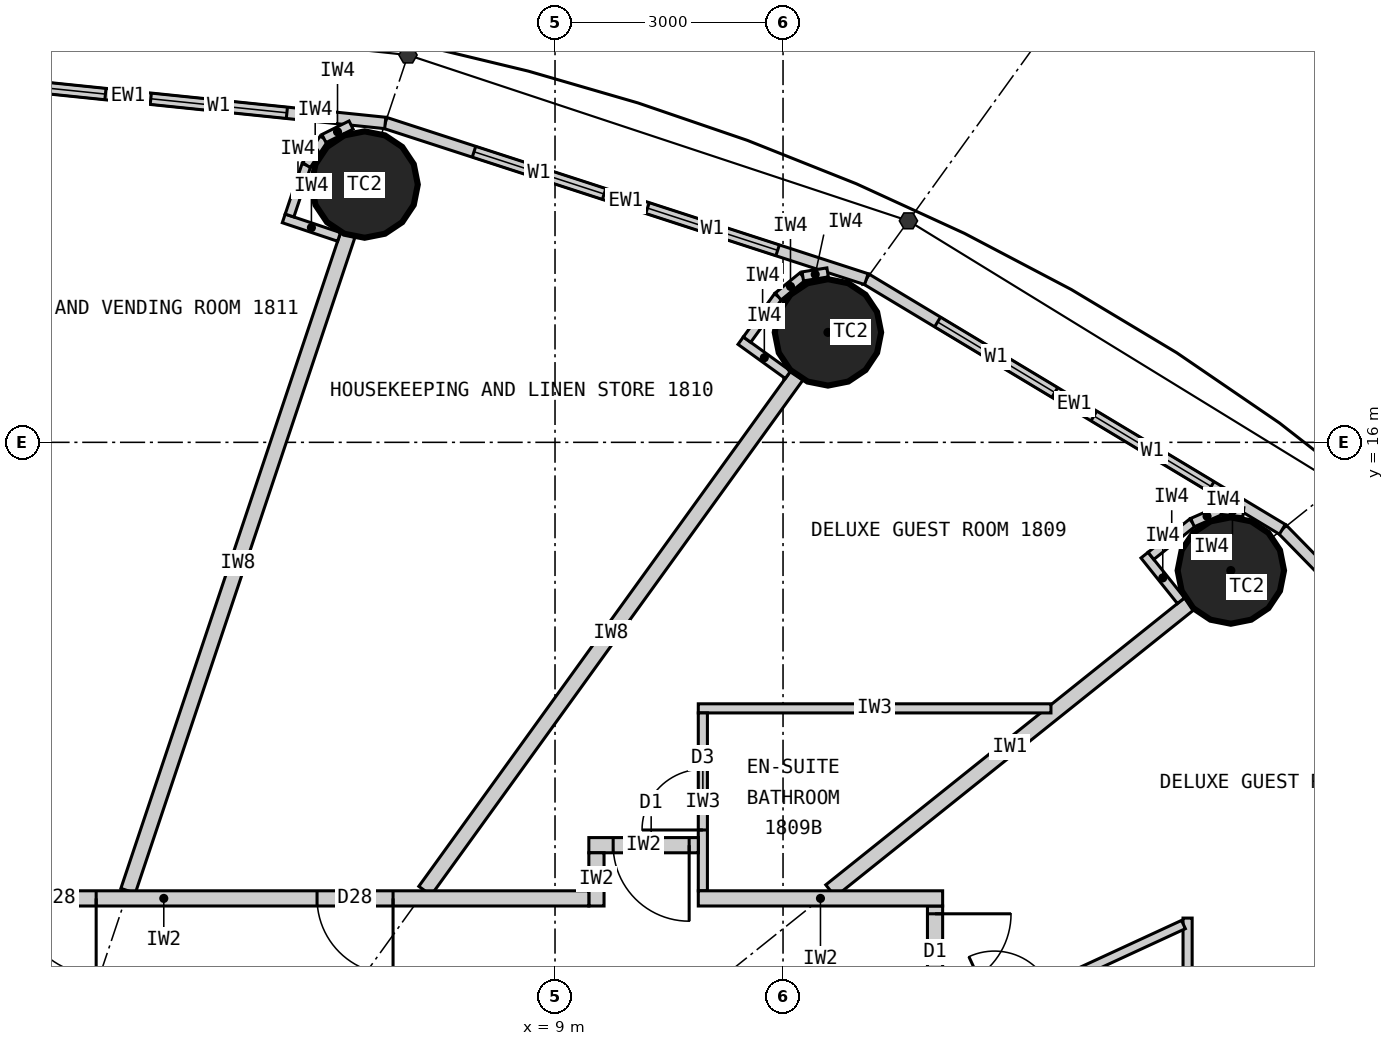
"""IFC4 building model, lengths in metres.
Left out: names, types, materials, properties, quantities, classifications, styles, units other than length and angle.
Written with IfcOpenShell. Run it as: python <this file> out.ifc"""

import sys

from ifc_helpers import new_model, si_unit, direction, frame, frame_2d, origin, origin_2d, place, context, subcontext, project, spatial, rectangle, circle, extrude, element, fill, save


model = new_model("IFC4")
c1 = context("Model", 3, precision=1e-05, world=origin(), true_north=direction((0.0, 1.0)))
c2 = subcontext(c1, "Body", "Model", "MODEL_VIEW")
j1 = project(units=[si_unit("LENGTHUNIT", "METRE"), si_unit("PLANEANGLEUNIT", "RADIAN")], contexts=[c1])
p1 = place(None, origin())
s1 = spatial("IfcSite", under=j1, at=p1, CompositionType="ELEMENT")
p2 = place(p1, origin())
s2 = spatial("IfcBuilding", under=s1, at=p2, CompositionType="ELEMENT")
p3 = place(p2, frame((0.0, 0.0, 73.8)))
s3 = spatial("IfcBuildingStorey", under=s2, at=p3, CompositionType="ELEMENT", Elevation=73.8)
for number, where, z_axis, x_axis in (
    (1, (17.892, 14.313, 0.0), (0.0, 0.0, 1.0), (1.0, 0.0, 0.0)),
    (2, (12.591, 17.447, 0.0), (0.0, 0.0, 1.0), (1.0, 0.0, 0.0)),
    (3, (6.495, 19.391, 0.0), (0.0, 0.0, 1.0), (1.0, 0.0, 0.0)),
):
    element("IfcColumn", number, at=place(p3, frame(where, z_axis=z_axis, x_axis=x_axis)), inside=s3, PredefinedType="COLUMN", context=c2, shape_type="SweptSolid", body=[
        extrude(circle(Radius=0.7, at=origin_2d()), origin(), (0.0, 0.0, 1.0), 3.3),
    ])
p4 = place(p3, frame((22.803, 10.532, 0.0), z_axis=(0.0, 0.0, 1.0), x_axis=(-0.699602905915, 0.714531856557, 0.0)))
e4 = element("IfcWall", 4, at=p4, inside=s3, PredefinedType="ELEMENTEDWALL", context=c2, shape_type="SweptSolid", body=[
    extrude(rectangle(XDim=6.051, YDim=0.15, at=frame_2d((3.025, 0.0))), origin(), (0.0, 0.0, 1.0), 3.12),
])
p5 = place(p4, frame((0.926, 0.0, 0.9)))
e5 = element("IfcOpeningElement", 5, at=p5, cuts=e4, PredefinedType="OPENING", context=c2, shape_type="SweptSolid", body=[
    extrude(rectangle(XDim=1.8, YDim=1.9, at=frame_2d((0.9, 0.95))), frame((0.0, 0.085, 0.0), z_axis=(0.0, -1.0, 0.0), x_axis=(1.0, 0.0, 0.0)), (0.0, 0.0, 1.0), 0.17),
])
p6 = place(p4, frame((3.325, 0.0, 0.9)))
e6 = element("IfcOpeningElement", 6, at=p6, cuts=e4, PredefinedType="OPENING", context=c2, shape_type="SweptSolid", body=[
    extrude(rectangle(XDim=1.8, YDim=1.9, at=frame_2d((0.9, 0.95))), frame((0.0, 0.085, 0.0), z_axis=(0.0, -1.0, 0.0), x_axis=(1.0, 0.0, 0.0)), (0.0, 0.0, 1.0), 0.17),
])
p7 = place(p3, frame((18.57, 14.856, 0.0), z_axis=(0.0, 0.0, 1.0), x_axis=(-0.856983180864, 0.515344377787, 0.0)))
e7 = element("IfcWall", 7, at=p7, inside=s3, PredefinedType="ELEMENTEDWALL", context=c2, shape_type="SweptSolid", body=[
    extrude(rectangle(XDim=6.386, YDim=0.15, at=frame_2d((3.193, 0.0))), origin(), (0.0, 0.0, 1.0), 3.12),
])
p8 = place(p7, frame((1.093, 0.0, 0.9)))
e8 = element("IfcOpeningElement", 8, at=p8, cuts=e7, PredefinedType="OPENING", context=c2, shape_type="SweptSolid", body=[
    extrude(rectangle(XDim=1.8, YDim=1.9, at=frame_2d((0.9, 0.95))), frame((0.0, 0.085, 0.0), z_axis=(0.0, -1.0, 0.0), x_axis=(1.0, 0.0, 0.0)), (0.0, 0.0, 1.0), 0.17),
])
p9 = place(p7, frame((3.493, 0.0, 0.9)))
e9 = element("IfcOpeningElement", 9, at=p9, cuts=e7, PredefinedType="OPENING", context=c2, shape_type="SweptSolid", body=[
    extrude(rectangle(XDim=1.8, YDim=1.9, at=frame_2d((0.9, 0.95))), frame((0.0, 0.085, 0.0), z_axis=(0.0, -1.0, 0.0), x_axis=(1.0, 0.0, 0.0)), (0.0, 0.0, 1.0), 0.17),
])
p10 = place(p3, frame((13.096, 18.147, 0.0), z_axis=(0.0, 0.0, 1.0), x_axis=(-0.951137534625, 0.308767534285, 0.0)))
e10 = element("IfcWall", 10, at=p10, inside=s3, PredefinedType="ELEMENTEDWALL", context=c2, shape_type="SweptSolid", body=[
    extrude(rectangle(XDim=6.655, YDim=0.15, at=frame_2d((3.328, 0.0))), origin(), (0.0, 0.0, 1.0), 3.12),
])
p11 = place(p10, frame((1.228, 0.0, 0.9)))
e11 = element("IfcOpeningElement", 11, at=p11, cuts=e10, PredefinedType="OPENING", context=c2, shape_type="SweptSolid", body=[
    extrude(rectangle(XDim=1.8, YDim=1.9, at=frame_2d((0.9, 0.95))), frame((0.0, 0.085, 0.0), z_axis=(0.0, -1.0, 0.0), x_axis=(1.0, 0.0, 0.0)), (0.0, 0.0, 1.0), 0.17),
])
p12 = place(p10, frame((3.628, 0.0, 0.9)))
e12 = element("IfcOpeningElement", 12, at=p12, cuts=e10, PredefinedType="OPENING", context=c2, shape_type="SweptSolid", body=[
    extrude(rectangle(XDim=1.8, YDim=1.9, at=frame_2d((0.9, 0.95))), frame((0.0, 0.085, 0.0), z_axis=(0.0, -1.0, 0.0), x_axis=(1.0, 0.0, 0.0)), (0.0, 0.0, 1.0), 0.17),
])
p13 = place(p3, frame((6.766, 20.202, 0.0), z_axis=(0.0, 0.0, 1.0), x_axis=(-0.994721394369, 0.102612609291, 0.0)))
e13 = element("IfcWall", 13, at=p13, inside=s3, PredefinedType="ELEMENTEDWALL", context=c2, shape_type="SweptSolid", body=[
    extrude(rectangle(XDim=6.802, YDim=0.15, at=frame_2d((3.401, 0.0))), origin(), (0.0, 0.0, 1.0), 3.12),
])
p14 = place(p13, frame((1.301, 0.0, 0.9)))
e14 = element("IfcOpeningElement", 14, at=p14, cuts=e13, PredefinedType="OPENING", context=c2, shape_type="SweptSolid", body=[
    extrude(rectangle(XDim=1.8, YDim=1.9, at=frame_2d((0.9, 0.95))), frame((0.0, 0.085, 0.0), z_axis=(0.0, -1.0, 0.0), x_axis=(1.0, 0.0, 0.0)), (0.0, 0.0, 1.0), 0.17),
])
p15 = place(p13, frame((3.701, 0.0, 0.9)))
e15 = element("IfcOpeningElement", 15, at=p15, cuts=e13, PredefinedType="OPENING", context=c2, shape_type="SweptSolid", body=[
    extrude(rectangle(XDim=1.8, YDim=1.9, at=frame_2d((0.9, 0.95))), frame((0.0, 0.085, 0.0), z_axis=(0.0, -1.0, 0.0), x_axis=(1.0, 0.0, 0.0)), (0.0, 0.0, 1.0), 0.17),
])
p16 = place(p3, frame((14.1, 6.512, 0.0), z_axis=(0.0, 0.0, 1.0), x_axis=(0.907832871056, 0.419332181247, 0.0)))
e16 = element("IfcWall", 16, at=p16, inside=s3, PredefinedType="PARTITIONING", context=c2, shape_type="SweptSolid", body=[
    extrude(rectangle(XDim=8.023, YDim=0.2, at=frame_2d((4.011, 0.0))), origin(), (0.0, 0.0, 1.0), 2.32),
])
p17 = place(p3, frame((12.625, 10.1, 0.0), z_axis=(0.0, 0.0, 1.0), x_axis=(0.780892451574, 0.624665493744, 0.0)))
e17 = element("IfcWall", 17, at=p17, inside=s3, PredefinedType="PARTITIONING", context=c2, shape_type="SweptSolid", body=[
    extrude(rectangle(XDim=6.045, YDim=0.2, at=frame_2d((3.022, 0.0))), origin(), (0.0, 0.0, 1.0), 2.32),
])
p18 = place(p3, frame((7.289, 10.1, 0.0), z_axis=(0.0, 0.0, 1.0), x_axis=(0.585198353053, 0.810890182197, 0.0)))
e18 = element("IfcWall", 18, at=p18, inside=s3, PredefinedType="PARTITIONING", context=c2, shape_type="SweptSolid", body=[
    extrude(rectangle(XDim=8.36, YDim=0.2, at=frame_2d((4.18, 0.0))), origin(), (0.0, 0.0, 1.0), 2.32),
])
p19 = place(p3, frame((3.383, 10.1, 0.0), z_axis=(0.0, 0.0, 1.0), x_axis=(0.31759592231, 0.948226149256, 0.0)))
e19 = element("IfcWall", 19, at=p19, inside=s3, PredefinedType="PARTITIONING", context=c2, shape_type="SweptSolid", body=[
    extrude(rectangle(XDim=9.098, YDim=0.2, at=frame_2d((4.549, 0.0))), origin(), (0.0, 0.0, 1.0), 2.32),
])
p20 = place(p3, frame((17.323, 8.101, 0.0), z_axis=(0.0, 0.0, 1.0), x_axis=(0.0, 1.0, 0.0)))
e20 = element("IfcWall", 20, at=p20, inside=s3, PredefinedType="PARTITIONING", context=c2, shape_type="SweptSolid", body=[
    extrude(rectangle(XDim=1.64, YDim=0.12, at=frame_2d((0.82, 0.0))), origin(), (0.0, 0.0, 1.0), 3.12),
])
p21 = place(p3, frame((14.1, 8.193, 0.0), z_axis=(0.0, 0.0, 1.0), x_axis=(0.907836493557, 0.419324338628, 0.0)))
e21 = element("IfcWall", 21, at=p21, inside=s3, PredefinedType="PARTITIONING", context=c2, shape_type="SweptSolid", body=[
    extrude(rectangle(XDim=3.49, YDim=0.12, at=frame_2d((1.745, 0.0))), origin(), (0.0, 0.0, 1.0), 3.12),
])
p22 = place(p21, frame((0.75, 0.0, 0.0)))
e22 = element("IfcOpeningElement", 22, at=p22, cuts=e21, PredefinedType="OPENING", context=c2, shape_type="SweptSolid", body=[
    extrude(rectangle(XDim=0.8, YDim=2.1, at=frame_2d((0.4, 1.05))), frame((0.0, 0.07, 0.0), z_axis=(0.0, -1.0, 0.0), x_axis=(1.0, 0.0, 0.0)), (0.0, 0.0, 1.0), 0.14),
])
p23 = place(p3, frame((15.525, 12.5, 0.0), z_axis=(0.0, 0.0, 1.0), x_axis=(-1.0, 0.0, 0.0)))
e23 = element("IfcWall", 23, at=p23, inside=s3, PredefinedType="PARTITIONING", context=c2, shape_type="SweptSolid", body=[
    extrude(rectangle(XDim=4.64, YDim=0.12, at=frame_2d((2.32, 0.0))), origin(), (0.0, 0.0, 1.0), 3.12),
])
p24 = place(p3, frame((10.945, 10.1, 0.0), z_axis=(0.0, 0.0, 1.0), x_axis=(0.0, 1.0, 0.0)))
e24 = element("IfcWall", 24, at=p24, inside=s3, PredefinedType="PARTITIONING", context=c2, shape_type="SweptSolid", body=[
    extrude(rectangle(XDim=2.34, YDim=0.12, at=frame_2d((1.17, 0.0))), origin(), (0.0, 0.0, 1.0), 3.12),
])
p25 = place(p24, frame((0.8, 0.0, 0.0)))
e25 = element("IfcOpeningElement", 25, at=p25, cuts=e24, PredefinedType="OPENING", context=c2, shape_type="SweptSolid", body=[
    extrude(rectangle(XDim=0.8, YDim=2.1, at=frame_2d((0.4, 1.05))), frame((0.0, 0.07, 0.0), z_axis=(0.0, -1.0, 0.0), x_axis=(1.0, 0.0, 0.0)), (0.0, 0.0, 1.0), 0.14),
])
p26 = place(p3, frame((9.445, 10.7, 0.0), z_axis=(0.0, 0.0, 1.0), x_axis=(1.0, 0.0, 0.0)))
e26 = element("IfcWall", 26, at=p26, inside=s3, PredefinedType="PARTITIONING", context=c2, shape_type="SweptSolid", body=[
    extrude(rectangle(XDim=1.44, YDim=0.2, at=frame_2d((0.72, 0.0))), origin(), (0.0, 0.0, 1.0), 3.12),
])
p27 = place(p26, frame((0.32, 0.0, 0.0)))
e27 = element("IfcOpeningElement", 27, at=p27, cuts=e26, PredefinedType="OPENING", context=c2, shape_type="SweptSolid", body=[
    extrude(rectangle(XDim=1.0, YDim=2.2, at=frame_2d((0.5, 1.1))), frame((0.0, 0.11, 0.0), z_axis=(0.0, -1.0, 0.0), x_axis=(1.0, 0.0, 0.0)), (0.0, 0.0, 1.0), 0.22),
])
p28 = place(p3, frame((9.545, 9.9, 0.0), z_axis=(0.0, 0.0, 1.0), x_axis=(0.0, 1.0, 0.0)))
e28 = element("IfcWall", 28, at=p28, inside=s3, PredefinedType="PARTITIONING", context=c2, shape_type="SweptSolid", body=[
    extrude(rectangle(XDim=0.7, YDim=0.2, at=frame_2d((0.35, 0.0))), origin(), (0.0, 0.0, 1.0), 3.12),
])
p29 = place(p3, frame((14.0, 4.772, 0.0), z_axis=(0.0, 0.0, 1.0), x_axis=(0.0, 1.0, 0.0)))
e29 = element("IfcWall", 29, at=p29, inside=s3, PredefinedType="PARTITIONING", context=c2, shape_type="SweptSolid", body=[
    extrude(rectangle(XDim=5.127, YDim=0.2, at=frame_2d((2.564, 0.0))), origin(), (0.0, 0.0, 1.0), 3.12),
])
p30 = place(p29, frame((4.025, 0.0, 0.0)))
e30 = element("IfcOpeningElement", 30, at=p30, cuts=e29, PredefinedType="OPENING", context=c2, shape_type="SweptSolid", body=[
    extrude(rectangle(XDim=1.0, YDim=2.2, at=frame_2d((0.5, 1.1))), frame((0.0, 0.11, 0.0), z_axis=(0.0, -1.0, 0.0), x_axis=(1.0, 0.0, 0.0)), (0.0, 0.0, 1.0), 0.22),
])
p31 = place(p3, frame((-1.74, 10.0, 0.0), z_axis=(0.0, 0.0, 1.0), x_axis=(1.0, 0.0, 0.0)))
e31 = element("IfcWall", 31, at=p31, inside=s3, PredefinedType="PARTITIONING", context=c2, shape_type="SweptSolid", body=[
    extrude(rectangle(XDim=11.185, YDim=0.2, at=frame_2d((5.593, 0.0))), origin(), (0.0, 0.0, 1.0), 3.12),
])
p32 = place(p31, frame((7.609, 0.0, 0.0)))
e32 = element("IfcOpeningElement", 32, at=p32, cuts=e31, PredefinedType="OPENING", context=c2, shape_type="SweptSolid", body=[
    extrude(rectangle(XDim=1.0, YDim=2.2, at=frame_2d((0.5, 1.1))), frame((0.0, 0.11, 0.0), z_axis=(0.0, -1.0, 0.0), x_axis=(1.0, 0.0, 0.0)), (0.0, 0.0, 1.0), 0.22),
])
p33 = place(p31, frame((3.703, 0.0, 0.0)))
e33 = element("IfcOpeningElement", 33, at=p33, cuts=e31, PredefinedType="OPENING", context=c2, shape_type="SweptSolid", body=[
    extrude(rectangle(XDim=1.0, YDim=2.2, at=frame_2d((0.5, 1.1))), frame((0.0, 0.11, 0.0), z_axis=(0.0, -1.0, 0.0), x_axis=(1.0, 0.0, 0.0)), (0.0, 0.0, 1.0), 0.22),
])
p34 = place(p3, frame((10.885, 10.0, 0.0), z_axis=(0.0, 0.0, 1.0), x_axis=(1.0, 0.0, 0.0)))
e34 = element("IfcWall", 34, at=p34, inside=s3, PredefinedType="PARTITIONING", context=c2, shape_type="SweptSolid", body=[
    extrude(rectangle(XDim=3.215, YDim=0.2, at=frame_2d((1.607, 0.0))), origin(), (0.0, 0.0, 1.0), 3.12),
])
p35 = place(p3, frame((17.236, 13.917, 0.0), z_axis=(0.0, 0.0, 1.0), x_axis=(-0.624695047554, 0.780868809443, 0.0)))
e35 = element("IfcWall", 35, at=p35, inside=s3, PredefinedType="PARTITIONING", context=c2, shape_type="SweptSolid", body=[
    extrude(rectangle(XDim=0.768, YDim=0.12, at=frame_2d((0.384, 0.0))), origin(), (0.0, 0.0, 1.0), 3.12),
])
p36 = place(p3, frame((16.841, 14.507, 0.0), z_axis=(0.0, 0.0, 1.0), x_axis=(0.780902834923, 0.62465251333, 0.0)))
e36 = element("IfcWall", 36, at=p36, inside=s3, PredefinedType="PARTITIONING", context=c2, shape_type="SweptSolid", body=[
    extrude(rectangle(XDim=0.7, YDim=0.12, at=frame_2d((0.35, 0.0))), origin(), (0.0, 0.0, 1.0), 3.12),
])
p37 = place(p3, frame((17.387, 14.944, 0.0), z_axis=(0.0, 0.0, 1.0), x_axis=(0.916036698064, 0.401094462441, 0.0)))
e37 = element("IfcWall", 37, at=p37, inside=s3, PredefinedType="PARTITIONING", context=c2, shape_type="SweptSolid", body=[
    extrude(rectangle(XDim=0.418, YDim=0.12, at=frame_2d((0.209, 0.0))), origin(), (0.0, 0.0, 1.0), 3.12),
])
p38 = place(p3, frame((17.77, 15.112, 0.0), z_axis=(0.0, 0.0, 1.0), x_axis=(0.993904401174, -0.110245368731, 0.0)))
e38 = element("IfcWall", 38, at=p38, inside=s3, PredefinedType="PARTITIONING", context=c2, shape_type="SweptSolid", body=[
    extrude(rectangle(XDim=0.288, YDim=0.12, at=frame_2d((0.144, 0.0))), origin(), (0.0, 0.0, 1.0), 3.12),
])
p39 = place(p3, frame((12.065, 16.889, 0.0), z_axis=(0.0, 0.0, 1.0), x_axis=(-0.810821798253, 0.585293098778, 0.0)))
e39 = element("IfcWall", 39, at=p39, inside=s3, PredefinedType="PARTITIONING", context=c2, shape_type="SweptSolid", body=[
    extrude(rectangle(XDim=0.768, YDim=0.12, at=frame_2d((0.384, 0.0))), origin(), (0.0, 0.0, 1.0), 3.12),
])
p40 = place(p3, frame((11.526, 17.351, 0.0), z_axis=(0.0, 0.0, 1.0), x_axis=(0.585223113993, 0.810872312296, 0.0)))
e40 = element("IfcWall", 40, at=p40, inside=s3, PredefinedType="PARTITIONING", context=c2, shape_type="SweptSolid", body=[
    extrude(rectangle(XDim=0.7, YDim=0.12, at=frame_2d((0.35, 0.0))), origin(), (0.0, 0.0, 1.0), 3.12),
])
p41 = place(p3, frame((11.936, 17.919, 0.0), z_axis=(0.0, 0.0, 1.0), x_axis=(0.775023088441, 0.631932917629, 0.0)))
e41 = element("IfcWall", 41, at=p41, inside=s3, PredefinedType="PARTITIONING", context=c2, shape_type="SweptSolid", body=[
    extrude(rectangle(XDim=0.418, YDim=0.12, at=frame_2d((0.209, 0.0))), origin(), (0.0, 0.0, 1.0), 3.12),
])
p42 = place(p3, frame((12.26, 18.183, 0.0), z_axis=(0.0, 0.0, 1.0), x_axis=(0.987218661664, 0.159371622511, 0.0)))
e42 = element("IfcWall", 42, at=p42, inside=s3, PredefinedType="PARTITIONING", context=c2, shape_type="SweptSolid", body=[
    extrude(rectangle(XDim=0.331, YDim=0.12, at=frame_2d((0.166, 0.0))), origin(), (0.0, 0.0, 1.0), 3.12),
])
p43 = place(p3, frame((6.159, 18.702, 0.0), z_axis=(0.0, 0.0, 1.0), x_axis=(-0.948173154049, 0.31775410295, 0.0)))
e43 = element("IfcWall", 43, at=p43, inside=s3, PredefinedType="PARTITIONING", context=c2, shape_type="SweptSolid", body=[
    extrude(rectangle(XDim=0.768, YDim=0.12, at=frame_2d((0.384, 0.0))), origin(), (0.0, 0.0, 1.0), 3.12),
])
p44 = place(p3, frame((5.507, 18.984, 0.0), z_axis=(0.0, 0.0, 1.0), x_axis=(0.317692050622, 0.948193946918, 0.0)))
e44 = element("IfcWall", 44, at=p44, inside=s3, PredefinedType="PARTITIONING", context=c2, shape_type="SweptSolid", body=[
    extrude(rectangle(XDim=0.7, YDim=0.12, at=frame_2d((0.35, 0.0))), origin(), (0.0, 0.0, 1.0), 3.12),
])
p45 = place(p3, frame((5.729, 19.648, 0.0), z_axis=(0.0, 0.0, 1.0), x_axis=(0.552135764955, 0.833754218615, 0.0)))
e45 = element("IfcWall", 45, at=p45, inside=s3, PredefinedType="PARTITIONING", context=c2, shape_type="SweptSolid", body=[
    extrude(rectangle(XDim=0.418, YDim=0.12, at=frame_2d((0.209, 0.0))), origin(), (0.0, 0.0, 1.0), 3.12),
])
p46 = place(p3, frame((5.96, 19.996, 0.0), z_axis=(0.0, 0.0, 1.0), x_axis=(0.895160725913, 0.445743507842, 0.0)))
e46 = element("IfcWall", 46, at=p46, inside=s3, PredefinedType="PARTITIONING", context=c2, shape_type="SweptSolid", body=[
    extrude(rectangle(XDim=0.399, YDim=0.12, at=frame_2d((0.199, 0.0))), origin(), (0.0, 0.0, 1.0), 3.12),
])
p47 = place(p8, origin())
e47 = element("IfcWindow", 47, at=p47, inside=s3, PartitioningType="SINGLE_PANEL", PredefinedType="WINDOW", context=c2, shape_type="SweptSolid", body=[
    extrude(rectangle(XDim=1.8, YDim=1.9, at=frame_2d((0.9, 0.95))), frame((0.0, 0.03, 0.0), z_axis=(0.0, -1.0, 0.0), x_axis=(1.0, 0.0, 0.0)), (0.0, 0.0, 1.0), 0.06),
])
fill(e8, e47)
p48 = place(p9, origin())
e48 = element("IfcWindow", 48, at=p48, inside=s3, PartitioningType="SINGLE_PANEL", PredefinedType="WINDOW", context=c2, shape_type="SweptSolid", body=[
    extrude(rectangle(XDim=1.8, YDim=1.9, at=frame_2d((0.9, 0.95))), frame((0.0, 0.03, 0.0), z_axis=(0.0, -1.0, 0.0), x_axis=(1.0, 0.0, 0.0)), (0.0, 0.0, 1.0), 0.06),
])
fill(e9, e48)
p49 = place(p11, origin())
e49 = element("IfcWindow", 49, at=p49, inside=s3, PartitioningType="SINGLE_PANEL", PredefinedType="WINDOW", context=c2, shape_type="SweptSolid", body=[
    extrude(rectangle(XDim=1.8, YDim=1.9, at=frame_2d((0.9, 0.95))), frame((0.0, 0.03, 0.0), z_axis=(0.0, -1.0, 0.0), x_axis=(1.0, 0.0, 0.0)), (0.0, 0.0, 1.0), 0.06),
])
fill(e11, e49)
p50 = place(p12, origin())
e50 = element("IfcWindow", 50, at=p50, inside=s3, PartitioningType="SINGLE_PANEL", PredefinedType="WINDOW", context=c2, shape_type="SweptSolid", body=[
    extrude(rectangle(XDim=1.8, YDim=1.9, at=frame_2d((0.9, 0.95))), frame((0.0, 0.03, 0.0), z_axis=(0.0, -1.0, 0.0), x_axis=(1.0, 0.0, 0.0)), (0.0, 0.0, 1.0), 0.06),
])
fill(e12, e50)
p51 = place(p14, origin())
e51 = element("IfcWindow", 51, at=p51, inside=s3, PartitioningType="SINGLE_PANEL", PredefinedType="WINDOW", context=c2, shape_type="SweptSolid", body=[
    extrude(rectangle(XDim=1.8, YDim=1.9, at=frame_2d((0.9, 0.95))), frame((0.0, 0.03, 0.0), z_axis=(0.0, -1.0, 0.0), x_axis=(1.0, 0.0, 0.0)), (0.0, 0.0, 1.0), 0.06),
])
fill(e14, e51)
p52 = place(p15, origin())
e52 = element("IfcWindow", 52, at=p52, inside=s3, PartitioningType="SINGLE_PANEL", PredefinedType="WINDOW", context=c2, shape_type="SweptSolid", body=[
    extrude(rectangle(XDim=1.8, YDim=1.9, at=frame_2d((0.9, 0.95))), frame((0.0, 0.03, 0.0), z_axis=(0.0, -1.0, 0.0), x_axis=(1.0, 0.0, 0.0)), (0.0, 0.0, 1.0), 0.06),
])
fill(e15, e52)
p53 = place(p30, origin())
e53 = element("IfcDoor", 53, at=p53, inside=s3, OperationType="SINGLE_SWING_RIGHT", PredefinedType="DOOR", context=c2, shape_type="SweptSolid", body=[
    extrude(rectangle(XDim=1.0, YDim=2.2, at=frame_2d((0.5, 1.1))), frame((0.0, 0.025, 0.0), z_axis=(0.0, -1.0, 0.0), x_axis=(1.0, 0.0, 0.0)), (0.0, 0.0, 1.0), 0.05),
])
fill(e30, e53)
p54 = place(p25, origin())
e54 = element("IfcDoor", 54, at=p54, inside=s3, OperationType="SINGLE_SWING_LEFT", PredefinedType="DOOR", context=c2, shape_type="SweptSolid", body=[
    extrude(rectangle(XDim=0.8, YDim=2.1, at=frame_2d((0.4, 1.05))), frame((0.0, 0.025, 0.0), z_axis=(0.0, -1.0, 0.0), x_axis=(1.0, 0.0, 0.0)), (0.0, 0.0, 1.0), 0.05),
])
fill(e25, e54)
p55 = place(p27, origin())
e55 = element("IfcDoor", 55, at=p55, inside=s3, OperationType="SINGLE_SWING_RIGHT", PredefinedType="DOOR", context=c2, shape_type="SweptSolid", body=[
    extrude(rectangle(XDim=1.0, YDim=2.2, at=frame_2d((0.5, 1.1))), frame((0.0, 0.025, 0.0), z_axis=(0.0, -1.0, 0.0), x_axis=(1.0, 0.0, 0.0)), (0.0, 0.0, 1.0), 0.05),
])
fill(e27, e55)
p56 = place(p32, origin())
e56 = element("IfcDoor", 56, at=p56, inside=s3, OperationType="SINGLE_SWING_RIGHT", PredefinedType="DOOR", context=c2, shape_type="SweptSolid", body=[
    extrude(rectangle(XDim=1.0, YDim=2.2, at=frame_2d((0.5, 1.1))), frame((0.0, 0.025, 0.0), z_axis=(0.0, -1.0, 0.0), x_axis=(1.0, 0.0, 0.0)), (0.0, 0.0, 1.0), 0.05),
])
fill(e32, e56)
p57 = place(p33, origin())
e57 = element("IfcDoor", 57, at=p57, inside=s3, OperationType="SINGLE_SWING_RIGHT", PredefinedType="DOOR", context=c2, shape_type="SweptSolid", body=[
    extrude(rectangle(XDim=1.0, YDim=2.2, at=frame_2d((0.5, 1.1))), frame((0.0, 0.025, 0.0), z_axis=(0.0, -1.0, 0.0), x_axis=(1.0, 0.0, 0.0)), (0.0, 0.0, 1.0), 0.05),
])
fill(e33, e57)
save(model, sys.argv[1])
